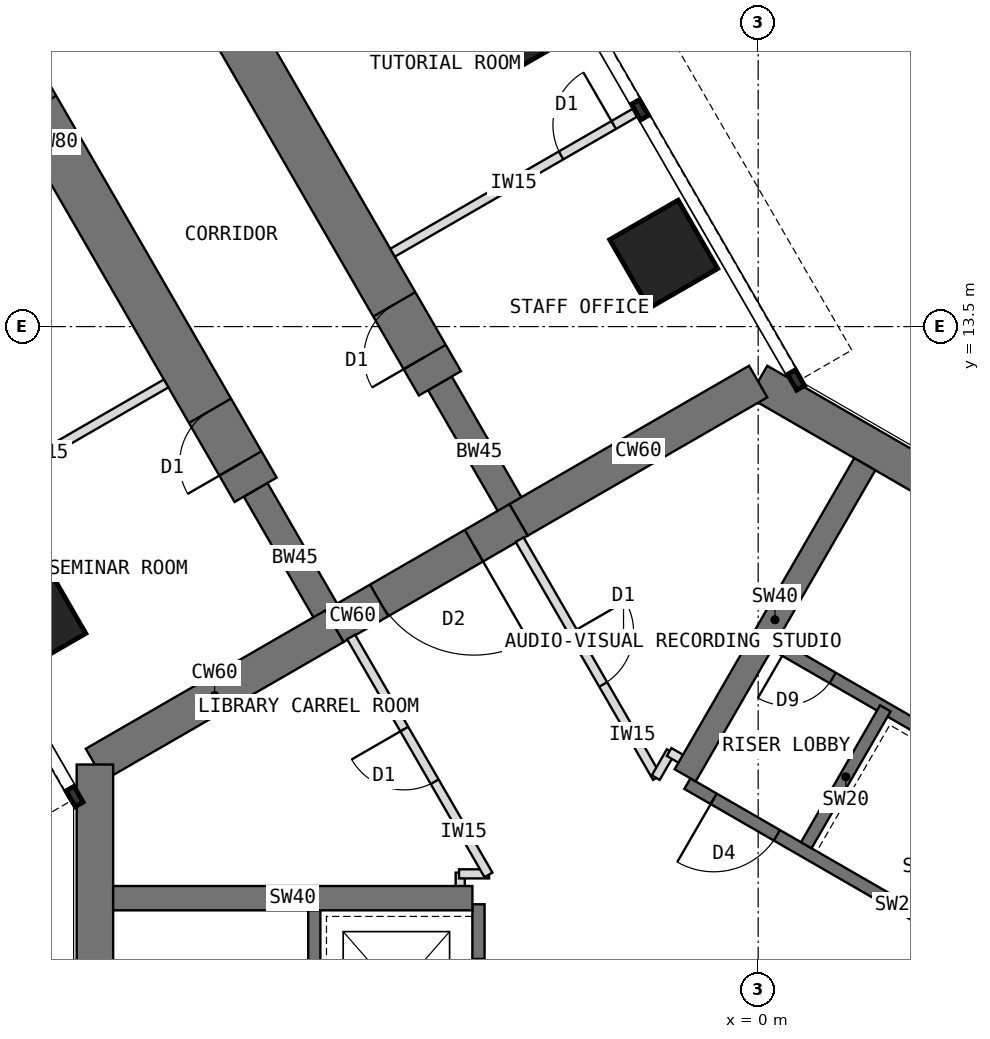
"""IFC4 building model, lengths in metres.
Left out: names, types, materials, properties, quantities, classifications, styles, units other than length and angle.
Written with IfcOpenShell. Run it as: python <this file> out.ifc"""

import sys

from ifc_helpers import new_model, si_unit, direction, frame, frame_2d, origin, origin_2d, place, context, subcontext, project, spatial, rectangle, extrude, element, fill, save


model = new_model("IFC4")
c1 = context("Model", 3, precision=1e-05, world=origin(), true_north=direction((0.0, 1.0)))
c2 = subcontext(c1, "Body", "Model", "MODEL_VIEW")
j1 = project(units=[si_unit("LENGTHUNIT", "METRE"), si_unit("PLANEANGLEUNIT", "RADIAN")], contexts=[c1])
p1 = place(None, origin())
s1 = spatial("IfcSite", under=j1, at=p1, CompositionType="ELEMENT")
p2 = place(p1, origin())
s2 = spatial("IfcBuilding", under=s1, at=p2, CompositionType="ELEMENT")
p3 = place(p2, frame((0.0, 0.0, 121.5)))
s3 = spatial("IfcBuildingStorey", under=s2, at=p3, CompositionType="ELEMENT", Elevation=121.5)
p4 = place(p3, frame((10.908, 6.298, 0.0), z_axis=(0.0, 0.0, 1.0), x_axis=(-0.866021940709, 0.500005998175, 0.0)))
e1 = element("IfcWall", 1, at=p4, inside=s3, PredefinedType="SHEAR", context=c2, shape_type="SweptSolid", body=[
    extrude(rectangle(XDim=12.596, YDim=0.6, at=frame_2d((6.298, 0.0))), origin(), (0.0, 0.0, 1.0), 4.0),
])
p5 = place(p3, frame((0.0, 12.596, 0.0), z_axis=(0.0, 0.0, 1.0), x_axis=(-0.866011268655, -0.500024481964, 0.0)))
e2 = element("IfcWall", 2, at=p5, inside=s3, PredefinedType="SHEAR", context=c2, shape_type="SweptSolid", body=[
    extrude(rectangle(XDim=4.548, YDim=0.6, at=frame_2d((2.274, 0.0))), origin(), (0.0, 0.0, 1.0), 4.0),
])
p6 = place(p3, frame((-3.939, 10.322, 0.0), z_axis=(0.0, 0.0, 1.0), x_axis=(-0.866019471182, -0.500010275428, 0.0)))
e3 = element("IfcWall", 3, at=p6, inside=s3, PredefinedType="SHEAR", context=c2, shape_type="SweptSolid", body=[
    extrude(rectangle(XDim=3.5, YDim=0.6, at=frame_2d((1.75, 0.0))), origin(), (0.0, 0.0, 1.0), 4.0),
])
p7 = place(p6, frame((0.85, 0.0, 0.0)))
e4 = element("IfcOpeningElement", 4, at=p7, cuts=e3, PredefinedType="OPENING", context=c2, shape_type="SweptSolid", body=[
    extrude(rectangle(XDim=1.8, YDim=2.1, at=frame_2d((0.9, 1.05))), frame((0.0, 0.31, 0.0), z_axis=(0.0, -1.0, 0.0), x_axis=(1.0, 0.0, 0.0)), (0.0, 0.0, 1.0), 0.62),
])
p8 = place(p3, frame((-6.97, 8.572, 0.0), z_axis=(0.0, 0.0, 1.0), x_axis=(-0.866034513004, -0.499984222037, 0.0)))
e5 = element("IfcWall", 5, at=p8, inside=s3, PredefinedType="SHEAR", context=c2, shape_type="SweptSolid", body=[
    extrude(rectangle(XDim=4.548, YDim=0.6, at=frame_2d((2.274, 0.0))), origin(), (0.0, 0.0, 1.0), 4.0),
])
p9 = place(p3, frame((-10.908, 6.298, 0.0), z_axis=(0.0, 0.0, 1.0), x_axis=(0.0, -1.0, 0.0)))
e6 = element("IfcWall", 6, at=p9, inside=s3, PredefinedType="SHEAR", context=c2, shape_type="SweptSolid", body=[
    extrude(rectangle(XDim=12.596, YDim=0.6, at=frame_2d((6.298, 0.0))), origin(), (0.0, 0.0, 1.0), 4.0),
])
p10 = place(p3, frame((-6.97, 8.572, 0.0), z_axis=(0.0, 0.0, 1.0), x_axis=(-0.499988811324, 0.866031863473, 0.0)))
e7 = element("IfcWall", 7, at=p10, inside=s3, PredefinedType="SHEAR", context=c2, shape_type="SweptSolid", body=[
    extrude(rectangle(XDim=2.592, YDim=0.45, at=frame_2d((1.296, 0.0))), origin(), (0.0, 0.0, 1.0), 4.0),
])
p11 = place(p3, frame((-8.266, 10.816, 0.0), z_axis=(0.0, 0.0, 1.0), x_axis=(-0.499996231654, 0.866027579429, 0.0)))
e8 = element("IfcWall", 8, at=p11, inside=s3, PredefinedType="SHEAR", context=c2, shape_type="SweptSolid", body=[
    extrude(rectangle(XDim=13.2, YDim=0.8, at=frame_2d((6.6, 0.0))), origin(), (0.0, 0.0, 1.0), 4.0),
])
p12 = place(p11, frame((0.5, 0.0, 0.0)))
e9 = element("IfcOpeningElement", 9, at=p12, cuts=e8, PredefinedType="OPENING", context=c2, shape_type="SweptSolid", body=[
    extrude(rectangle(XDim=1.0, YDim=2.1, at=frame_2d((0.5, 1.05))), frame((0.0, 0.41, 0.0), z_axis=(0.0, -1.0, 0.0), x_axis=(1.0, 0.0, 0.0)), (0.0, 0.0, 1.0), 0.82),
])
p13 = place(p11, frame((7.25, 0.0, 0.0)))
e10 = element("IfcOpeningElement", 10, at=p13, cuts=e8, PredefinedType="OPENING", context=c2, shape_type="SweptSolid", body=[
    extrude(rectangle(XDim=1.0, YDim=2.1, at=frame_2d((0.5, 1.05))), frame((0.0, 0.41, 0.0), z_axis=(0.0, -1.0, 0.0), x_axis=(1.0, 0.0, 0.0)), (0.0, 0.0, 1.0), 0.82),
])
p14 = place(p3, frame((-3.939, 10.322, 0.0), z_axis=(0.0, 0.0, 1.0), x_axis=(-0.499918158782, 0.866072649678, 0.0)))
e11 = element("IfcWall", 11, at=p14, inside=s3, PredefinedType="SHEAR", context=c2, shape_type="SweptSolid", body=[
    extrude(rectangle(XDim=2.592, YDim=0.45, at=frame_2d((1.296, 0.0))), origin(), (0.0, 0.0, 1.0), 4.0),
])
p15 = place(p3, frame((-5.234, 12.566, 0.0), z_axis=(0.0, 0.0, 1.0), x_axis=(-0.500010103361, 0.866019570528, 0.0)))
e12 = element("IfcWall", 12, at=p15, inside=s3, PredefinedType="SHEAR", context=c2, shape_type="SweptSolid", body=[
    extrude(rectangle(XDim=13.2, YDim=0.8, at=frame_2d((6.6, 0.0))), origin(), (0.0, 0.0, 1.0), 4.0),
])
p16 = place(p15, frame((0.5, 0.0, 0.0)))
e13 = element("IfcOpeningElement", 13, at=p16, cuts=e12, PredefinedType="OPENING", context=c2, shape_type="SweptSolid", body=[
    extrude(rectangle(XDim=1.0, YDim=2.1, at=frame_2d((0.5, 1.05))), frame((0.0, 0.41, 0.0), z_axis=(0.0, -1.0, 0.0), x_axis=(1.0, 0.0, 0.0)), (0.0, 0.0, 1.0), 0.82),
])
p17 = place(p15, frame((7.25, 0.0, 0.0)))
e14 = element("IfcOpeningElement", 14, at=p17, cuts=e12, PredefinedType="OPENING", context=c2, shape_type="SweptSolid", body=[
    extrude(rectangle(XDim=1.0, YDim=2.1, at=frame_2d((0.5, 1.05))), frame((0.0, 0.41, 0.0), z_axis=(0.0, -1.0, 0.0), x_axis=(1.0, 0.0, 0.0)), (0.0, 0.0, 1.0), 0.82),
])
for number, where, z_axis, x_axis in (
    (15, (-11.946, 8.691, 0.0), (0.0, 0.0, 1.0), (0.866, 0.5, 0.0)),
    (16, (-1.554, 14.691, 0.0), (0.0, 0.0, 1.0), (0.866, 0.5, 0.0)),
    (17, (-3.804, 18.588, 0.0), (0.0, 0.0, 1.0), (0.866, 0.5, 0.0)),
):
    element("IfcColumn", number, at=place(p3, frame(where, z_axis=z_axis, x_axis=x_axis)), inside=s3, PredefinedType="COLUMN", context=c2, shape_type="SweptSolid", body=[
        extrude(rectangle(XDim=1.3, YDim=1.3, at=origin_2d()), origin(), (0.0, 0.0, 1.0), 4.0),
    ])
p18 = place(p3, frame((5.764, 1.984, 0.0), z_axis=(0.0, 0.0, 1.0), x_axis=(-0.866026010844, 0.49999894854, 0.0)))
e18 = element("IfcWall", 18, at=p18, inside=s3, PredefinedType="SHEAR", context=c2, shape_type="SweptSolid", body=[
    extrude(rectangle(XDim=8.0, YDim=0.2, at=frame_2d((4.0, 0.0))), origin(), (0.0, 0.0, 1.0), 4.0),
])
p19 = place(p18, frame((6.3, 0.0, 0.0)))
e19 = element("IfcOpeningElement", 19, at=p19, cuts=e18, PredefinedType="OPENING", context=c2, shape_type="SweptSolid", body=[
    extrude(rectangle(XDim=1.2, YDim=2.1, at=frame_2d((0.6, 1.05))), frame((0.0, 0.11, 0.0), z_axis=(0.0, -1.0, 0.0), x_axis=(1.0, 0.0, 0.0)), (0.0, 0.0, 1.0), 0.22),
])
p20 = place(p3, frame((0.791, 4.97, 0.0), z_axis=(0.0, 0.0, 1.0), x_axis=(0.499936506574, 0.866062058628, 0.0)))
e20 = element("IfcWall", 20, at=p20, inside=s3, PredefinedType="SHEAR", context=c2, shape_type="SweptSolid", body=[
    extrude(rectangle(XDim=2.6, YDim=0.2, at=frame_2d((1.3, 0.0))), origin(), (0.0, 0.0, 1.0), 4.0),
])
p21 = place(p3, frame((7.114, 4.322, 0.0), z_axis=(0.0, 0.0, 1.0), x_axis=(-0.866026010844, 0.49999894854, 0.0)))
e21 = element("IfcWall", 21, at=p21, inside=s3, PredefinedType="SHEAR", context=c2, shape_type="SweptSolid", body=[
    extrude(rectangle(XDim=8.0, YDim=0.2, at=frame_2d((4.0, 0.0))), origin(), (0.0, 0.0, 1.0), 4.0),
])
p22 = place(p21, frame((6.8, 0.0, 0.0)))
e22 = element("IfcOpeningElement", 22, at=p22, cuts=e21, PredefinedType="OPENING", context=c2, shape_type="SweptSolid", body=[
    extrude(rectangle(XDim=0.9, YDim=2.1, at=frame_2d((0.45, 1.05))), frame((0.0, 0.11, 0.0), z_axis=(0.0, -1.0, 0.0), x_axis=(1.0, 0.0, 0.0)), (0.0, 0.0, 1.0), 0.22),
])
p23 = place(p3, frame((-1.201, 6.12, 0.0), z_axis=(0.0, 0.0, 1.0), x_axis=(0.49999668571, 0.866027317282, 0.0)))
e23 = element("IfcWall", 23, at=p23, inside=s3, PredefinedType="SHEAR", context=c2, shape_type="SweptSolid", body=[
    extrude(rectangle(XDim=5.908, YDim=0.4, at=frame_2d((2.954, 0.0))), origin(), (0.0, 0.0, 1.0), 4.0),
])
p24 = place(p3, frame((-4.6, 4.0, 0.0), z_axis=(0.0, 0.0, 1.0), x_axis=(0.0, -1.0, 0.0)))
e24 = element("IfcWall", 24, at=p24, inside=s3, PredefinedType="SHEAR", context=c2, shape_type="SweptSolid", body=[
    extrude(rectangle(XDim=8.0, YDim=0.2, at=frame_2d((4.0, 0.0))), origin(), (0.0, 0.0, 1.0), 4.0),
])
p25 = place(p24, frame((6.3, 0.0, 0.0)))
e25 = element("IfcOpeningElement", 25, at=p25, cuts=e24, PredefinedType="OPENING", context=c2, shape_type="SweptSolid", body=[
    extrude(rectangle(XDim=1.2, YDim=2.1, at=frame_2d((0.6, 1.05))), frame((0.0, 0.11, 0.0), z_axis=(0.0, -1.0, 0.0), x_axis=(1.0, 0.0, 0.0)), (0.0, 0.0, 1.0), 0.22),
])
p26 = place(p24, frame((0.9, 0.0, 0.0)))
e26 = element("IfcOpeningElement", 26, at=p26, cuts=e24, PredefinedType="OPENING", context=c2, shape_type="SweptSolid", body=[
    extrude(rectangle(XDim=1.1, YDim=2.2, at=frame_2d((0.55, 1.1))), frame((0.0, 0.11, 0.0), z_axis=(0.0, -1.0, 0.0), x_axis=(1.0, 0.0, 0.0)), (0.0, 0.0, 1.0), 0.22),
])
p27 = place(p3, frame((-7.3, 4.0, 0.0), z_axis=(0.0, 0.0, 1.0), x_axis=(0.0, -1.0, 0.0)))
e27 = element("IfcWall", 27, at=p27, inside=s3, PredefinedType="SHEAR", context=c2, shape_type="SweptSolid", body=[
    extrude(rectangle(XDim=8.0, YDim=0.2, at=frame_2d((4.0, 0.0))), origin(), (0.0, 0.0, 1.0), 4.0),
])
p28 = place(p27, frame((6.7, 0.0, 0.0)))
e28 = element("IfcOpeningElement", 28, at=p28, cuts=e27, PredefinedType="OPENING", context=c2, shape_type="SweptSolid", body=[
    extrude(rectangle(XDim=1.1, YDim=2.1, at=frame_2d((0.55, 1.05))), frame((0.0, 0.11, 0.0), z_axis=(0.0, -1.0, 0.0), x_axis=(1.0, 0.0, 0.0)), (0.0, 0.0, 1.0), 0.22),
])
p29 = place(p3, frame((-4.7, 4.1, 0.0), z_axis=(0.0, 0.0, 1.0), x_axis=(-1.0, 0.0, 0.0)))
e29 = element("IfcWall", 29, at=p29, inside=s3, PredefinedType="SHEAR", context=c2, shape_type="SweptSolid", body=[
    extrude(rectangle(XDim=5.908, YDim=0.4, at=frame_2d((2.954, 0.0))), origin(), (0.0, 0.0, 1.0), 4.0),
])
p30 = place(p3, frame((-9.737, 12.565, 0.0), z_axis=(0.0, 0.0, 1.0), x_axis=(-0.866016770315, -0.500014953309, 0.0)))
e30 = element("IfcWall", 30, at=p30, inside=s3, PredefinedType="PARTITIONING", context=c2, shape_type="SweptSolid", body=[
    extrude(rectangle(XDim=4.6, YDim=0.15, at=frame_2d((2.3, 0.0))), origin(), (0.0, 0.0, 1.0), 3.8),
])
p31 = place(p3, frame((-6.013, 14.715, 0.0), z_axis=(0.0, 0.0, 1.0), x_axis=(0.866016770315, 0.500014953309, 0.0)))
e31 = element("IfcWall", 31, at=p31, inside=s3, PredefinedType="PARTITIONING", context=c2, shape_type="SweptSolid", body=[
    extrude(rectangle(XDim=4.6, YDim=0.15, at=frame_2d((2.3, 0.0))), origin(), (0.0, 0.0, 1.0), 3.8),
])
p32 = place(p31, frame((3.2, 0.0, 0.0)))
e32 = element("IfcOpeningElement", 32, at=p32, cuts=e31, PredefinedType="OPENING", context=c2, shape_type="SweptSolid", body=[
    extrude(rectangle(XDim=1.0, YDim=2.1, at=frame_2d((0.5, 1.05))), frame((0.0, 0.085, 0.0), z_axis=(0.0, -1.0, 0.0), x_axis=(1.0, 0.0, 0.0)), (0.0, 0.0, 1.0), 0.17),
])
p33 = place(p3, frame((-4.9, 4.09, 0.0), z_axis=(0.0, 0.0, 1.0), x_axis=(0.0, 1.0, 0.0)))
e33 = element("IfcWall", 33, at=p33, inside=s3, PredefinedType="PARTITIONING", context=c2, shape_type="SweptSolid", body=[
    extrude(rectangle(XDim=0.43, YDim=0.15, at=frame_2d((0.215, 0.0))), origin(), (0.0, 0.0, 1.0), 3.8),
])
p34 = place(p3, frame((-4.92, 4.5, 0.0), z_axis=(0.0, 0.0, 1.0), x_axis=(1.0, 0.0, 0.0)))
e34 = element("IfcWall", 34, at=p34, inside=s3, PredefinedType="PARTITIONING", context=c2, shape_type="SweptSolid", body=[
    extrude(rectangle(XDim=0.494, YDim=0.15, at=frame_2d((0.247, 0.0))), origin(), (0.0, 0.0, 1.0), 3.8),
])
p35 = place(p3, frame((-4.436, 4.483, 0.0), z_axis=(0.0, 0.0, 1.0), x_axis=(-0.500009315796, 0.86602002524, 0.0)))
e35 = element("IfcWall", 35, at=p35, inside=s3, PredefinedType="PARTITIONING", context=c2, shape_type="SweptSolid", body=[
    extrude(rectangle(XDim=4.519, YDim=0.15, at=frame_2d((2.259, 0.0))), origin(), (0.0, 0.0, 1.0), 3.8),
])
p36 = place(p35, frame((1.769, 0.0, 0.0)))
e36 = element("IfcOpeningElement", 36, at=p36, cuts=e35, PredefinedType="OPENING", context=c2, shape_type="SweptSolid", body=[
    extrude(rectangle(XDim=1.0, YDim=2.1, at=frame_2d((0.5, 1.05))), frame((0.0, 0.085, 0.0), z_axis=(0.0, -1.0, 0.0), x_axis=(1.0, 0.0, 0.0)), (0.0, 0.0, 1.0), 0.17),
])
p37 = place(p3, frame((-3.924, 9.996, 0.0), z_axis=(0.0, 0.0, 1.0), x_axis=(0.500032713409, -0.866006515865, 0.0)))
e37 = element("IfcWall", 37, at=p37, inside=s3, PredefinedType="PARTITIONING", context=c2, shape_type="SweptSolid", body=[
    extrude(rectangle(XDim=4.518, YDim=0.15, at=frame_2d((2.259, 0.0))), origin(), (0.0, 0.0, 1.0), 3.8),
])
p38 = place(p37, frame((1.749, 0.0, 0.0)))
e38 = element("IfcOpeningElement", 38, at=p38, cuts=e37, PredefinedType="OPENING", context=c2, shape_type="SweptSolid", body=[
    extrude(rectangle(XDim=1.0, YDim=2.1, at=frame_2d((0.5, 1.05))), frame((0.0, 0.085, 0.0), z_axis=(0.0, -1.0, 0.0), x_axis=(1.0, 0.0, 0.0)), (0.0, 0.0, 1.0), 0.17),
])
p39 = place(p3, frame((-1.684, 6.083, 0.0), z_axis=(0.0, 0.0, 1.0), x_axis=(0.50033519877, 0.865831790172, 0.0)))
e39 = element("IfcWall", 39, at=p39, inside=s3, PredefinedType="PARTITIONING", context=c2, shape_type="SweptSolid", body=[
    extrude(rectangle(XDim=0.494, YDim=0.15, at=frame_2d((0.247, 0.0))), origin(), (0.0, 0.0, 1.0), 3.8),
])
p40 = place(p3, frame((-1.464, 6.503, 0.0), z_axis=(0.0, 0.0, 1.0), x_axis=(0.866138304741, -0.499804398801, 0.0)))
e40 = element("IfcWall", 40, at=p40, inside=s3, PredefinedType="PARTITIONING", context=c2, shape_type="SweptSolid", body=[
    extrude(rectangle(XDim=0.43, YDim=0.15, at=frame_2d((0.215, 0.0))), origin(), (0.0, 0.0, 1.0), 3.8),
])
p41 = place(p19, origin())
e41 = element("IfcDoor", 41, at=p41, inside=s3, OperationType="SINGLE_SWING_RIGHT", PredefinedType="DOOR", context=c2, shape_type="SweptSolid", body=[
    extrude(rectangle(XDim=1.2, YDim=2.1, at=frame_2d((0.6, 1.05))), frame((0.0, 0.025, 0.0), z_axis=(0.0, -1.0, 0.0), x_axis=(1.0, 0.0, 0.0)), (0.0, 0.0, 1.0), 0.05),
])
fill(e19, e41)
p42 = place(p22, origin())
e42 = element("IfcDoor", 42, at=p42, inside=s3, OperationType="SINGLE_SWING_RIGHT", PredefinedType="DOOR", context=c2, shape_type="SweptSolid", body=[
    extrude(rectangle(XDim=0.9, YDim=2.1, at=frame_2d((0.45, 1.05))), frame((0.0, 0.025, 0.0), z_axis=(0.0, -1.0, 0.0), x_axis=(1.0, 0.0, 0.0)), (0.0, 0.0, 1.0), 0.05),
])
fill(e22, e42)
p43 = place(p7, origin())
e43 = element("IfcDoor", 43, at=p43, inside=s3, OperationType="DOUBLE_DOOR_DOUBLE_SWING", PredefinedType="DOOR", context=c2, shape_type="SweptSolid", body=[
    extrude(rectangle(XDim=1.72, YDim=2.06, at=frame_2d((0.9, 1.03))), frame((0.0, 0.025, 0.0), z_axis=(0.0, -1.0, 0.0), x_axis=(1.0, 0.0, 0.0)), (0.0, 0.0, 1.0), 0.05),
    extrude(rectangle(XDim=0.04, YDim=2.1, at=frame_2d((0.02, 1.05))), frame((0.0, 0.3, 0.0), z_axis=(0.0, -1.0, 0.0), x_axis=(1.0, 0.0, 0.0)), (0.0, 0.0, 1.0), 0.6),
    extrude(rectangle(XDim=0.04, YDim=2.1, at=frame_2d((1.78, 1.05))), frame((0.0, 0.3, 0.0), z_axis=(0.0, -1.0, 0.0), x_axis=(1.0, 0.0, 0.0)), (0.0, 0.0, 1.0), 0.6),
    extrude(rectangle(XDim=1.72, YDim=0.04, at=frame_2d((0.9, 2.08))), frame((0.0, 0.3, 0.0), z_axis=(0.0, -1.0, 0.0), x_axis=(1.0, 0.0, 0.0)), (0.0, 0.0, 1.0), 0.6),
])
fill(e4, e43)
p44 = place(p32, origin())
e44 = element("IfcDoor", 44, at=p44, inside=s3, OperationType="SINGLE_SWING_RIGHT", PredefinedType="DOOR", context=c2, shape_type="SweptSolid", body=[
    extrude(rectangle(XDim=1.0, YDim=2.1, at=frame_2d((0.5, 1.05))), frame((0.0, 0.025, 0.0), z_axis=(0.0, -1.0, 0.0), x_axis=(1.0, 0.0, 0.0)), (0.0, 0.0, 1.0), 0.05),
])
fill(e32, e44)
p45 = place(p38, origin())
e45 = element("IfcDoor", 45, at=p45, inside=s3, OperationType="SINGLE_SWING_LEFT", PredefinedType="DOOR", context=c2, shape_type="SweptSolid", body=[
    extrude(rectangle(XDim=1.0, YDim=2.1, at=frame_2d((0.5, 1.05))), frame((0.0, 0.025, 0.0), z_axis=(0.0, -1.0, 0.0), x_axis=(1.0, 0.0, 0.0)), (0.0, 0.0, 1.0), 0.05),
])
fill(e38, e45)
p46 = place(p36, origin())
e46 = element("IfcDoor", 46, at=p46, inside=s3, OperationType="SINGLE_SWING_RIGHT", PredefinedType="DOOR", context=c2, shape_type="SweptSolid", body=[
    extrude(rectangle(XDim=1.0, YDim=2.1, at=frame_2d((0.5, 1.05))), frame((0.0, 0.025, 0.0), z_axis=(0.0, -1.0, 0.0), x_axis=(1.0, 0.0, 0.0)), (0.0, 0.0, 1.0), 0.05),
])
fill(e36, e46)
p47 = place(p12, origin())
e47 = element("IfcDoor", 47, at=p47, inside=s3, OperationType="SINGLE_SWING_LEFT", PredefinedType="DOOR", context=c2, shape_type="SweptSolid", body=[
    extrude(rectangle(XDim=0.92, YDim=2.06, at=frame_2d((0.5, 1.03))), frame((0.0, 0.025, 0.0), z_axis=(0.0, -1.0, 0.0), x_axis=(1.0, 0.0, 0.0)), (0.0, 0.0, 1.0), 0.05),
    extrude(rectangle(XDim=0.04, YDim=2.1, at=frame_2d((0.02, 1.05))), frame((0.0, 0.4, 0.0), z_axis=(0.0, -1.0, 0.0), x_axis=(1.0, 0.0, 0.0)), (0.0, 0.0, 1.0), 0.8),
    extrude(rectangle(XDim=0.04, YDim=2.1, at=frame_2d((0.98, 1.05))), frame((0.0, 0.4, 0.0), z_axis=(0.0, -1.0, 0.0), x_axis=(1.0, 0.0, 0.0)), (0.0, 0.0, 1.0), 0.8),
    extrude(rectangle(XDim=0.92, YDim=0.04, at=frame_2d((0.5, 2.08))), frame((0.0, 0.4, 0.0), z_axis=(0.0, -1.0, 0.0), x_axis=(1.0, 0.0, 0.0)), (0.0, 0.0, 1.0), 0.8),
])
fill(e9, e47)
p48 = place(p13, origin())
e48 = element("IfcDoor", 48, at=p48, inside=s3, OperationType="SINGLE_SWING_RIGHT", PredefinedType="DOOR", context=c2, shape_type="SweptSolid", body=[
    extrude(rectangle(XDim=0.92, YDim=2.06, at=frame_2d((0.5, 1.03))), frame((0.0, 0.025, 0.0), z_axis=(0.0, -1.0, 0.0), x_axis=(1.0, 0.0, 0.0)), (0.0, 0.0, 1.0), 0.05),
    extrude(rectangle(XDim=0.04, YDim=2.1, at=frame_2d((0.02, 1.05))), frame((0.0, 0.4, 0.0), z_axis=(0.0, -1.0, 0.0), x_axis=(1.0, 0.0, 0.0)), (0.0, 0.0, 1.0), 0.8),
    extrude(rectangle(XDim=0.04, YDim=2.1, at=frame_2d((0.98, 1.05))), frame((0.0, 0.4, 0.0), z_axis=(0.0, -1.0, 0.0), x_axis=(1.0, 0.0, 0.0)), (0.0, 0.0, 1.0), 0.8),
    extrude(rectangle(XDim=0.92, YDim=0.04, at=frame_2d((0.5, 2.08))), frame((0.0, 0.4, 0.0), z_axis=(0.0, -1.0, 0.0), x_axis=(1.0, 0.0, 0.0)), (0.0, 0.0, 1.0), 0.8),
])
fill(e10, e48)
p49 = place(p16, origin())
e49 = element("IfcDoor", 49, at=p49, inside=s3, OperationType="SINGLE_SWING_LEFT", PredefinedType="DOOR", context=c2, shape_type="SweptSolid", body=[
    extrude(rectangle(XDim=0.92, YDim=2.06, at=frame_2d((0.5, 1.03))), frame((0.0, 0.025, 0.0), z_axis=(0.0, -1.0, 0.0), x_axis=(1.0, 0.0, 0.0)), (0.0, 0.0, 1.0), 0.05),
    extrude(rectangle(XDim=0.04, YDim=2.1, at=frame_2d((0.02, 1.05))), frame((0.0, 0.4, 0.0), z_axis=(0.0, -1.0, 0.0), x_axis=(1.0, 0.0, 0.0)), (0.0, 0.0, 1.0), 0.8),
    extrude(rectangle(XDim=0.04, YDim=2.1, at=frame_2d((0.98, 1.05))), frame((0.0, 0.4, 0.0), z_axis=(0.0, -1.0, 0.0), x_axis=(1.0, 0.0, 0.0)), (0.0, 0.0, 1.0), 0.8),
    extrude(rectangle(XDim=0.92, YDim=0.04, at=frame_2d((0.5, 2.08))), frame((0.0, 0.4, 0.0), z_axis=(0.0, -1.0, 0.0), x_axis=(1.0, 0.0, 0.0)), (0.0, 0.0, 1.0), 0.8),
])
fill(e13, e49)
save(model, sys.argv[1])
